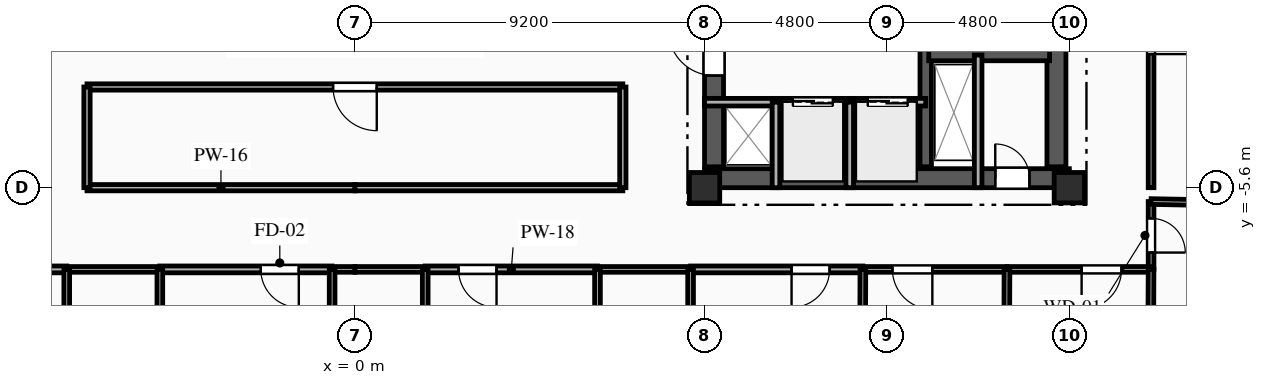
"""IFC4 building model, lengths in metres.
Left out: names, types, materials, properties, quantities, classifications, styles, units other than length and angle.
Written with IfcOpenShell. Run it as: python <this file> out.ifc"""

import sys

from ifc_helpers import new_model, si_unit, direction, frame, frame_2d, origin, origin_2d, place, context, subcontext, project, spatial, rectangle, extrude, element, fill, save


model = new_model("IFC4")
c1 = context("Model", 3, precision=1e-05, world=origin(), true_north=direction((0.0, 1.0)))
c2 = subcontext(c1, "Body", "Model", "MODEL_VIEW")
j1 = project(units=[si_unit("LENGTHUNIT", "METRE"), si_unit("PLANEANGLEUNIT", "RADIAN")], contexts=[c1])
p1 = place(None, origin())
s1 = spatial("IfcSite", under=j1, at=p1, CompositionType="ELEMENT")
p2 = place(p1, origin())
s2 = spatial("IfcBuilding", under=s1, at=p2, CompositionType="ELEMENT")
p3 = place(p2, frame((0.0, 0.0, 206.45)))
s3 = spatial("IfcBuildingStorey", under=s2, at=p3, CompositionType="ELEMENT", Elevation=206.45)
for number, where, z_axis, x_axis in (
    (1, (9.2, -5.6, 0.0), (0.0, 0.0, 1.0), (1.0, 0.0, 0.0)),
    (2, (18.8, -5.6, 0.0), (0.0, 0.0, 1.0), (1.0, 0.0, 0.0)),
):
    element("IfcColumn", number, at=place(p3, frame(where, z_axis=z_axis, x_axis=x_axis)), inside=s3, PredefinedType="COLUMN", context=c2, shape_type="SweptSolid", body=[
        extrude(rectangle(XDim=0.8, YDim=0.8, at=origin_2d()), origin(), (0.0, 0.0, 1.0), 3.35),
    ])
p4 = place(p3, frame((9.2, -5.35, 0.0), z_axis=(0.0, 0.0, 1.0), x_axis=(1.0, 0.0, 0.0)))
e3 = element("IfcWall", 3, at=p4, inside=s3, PredefinedType="SHEAR", context=c2, shape_type="SweptSolid", body=[
    extrude(rectangle(XDim=9.6, YDim=0.5, at=frame_2d((4.8, 0.0))), origin(), (0.0, 0.0, 1.0), 3.04),
])
p5 = place(p4, frame((7.65, 0.0, 0.0)))
e4 = element("IfcOpeningElement", 4, at=p5, cuts=e3, PredefinedType="OPENING", context=c2, shape_type="SweptSolid", body=[
    extrude(rectangle(XDim=0.9, YDim=2.1, at=frame_2d((0.45, 1.05))), frame((0.0, 0.26, 0.0), z_axis=(0.0, -1.0, 0.0), x_axis=(1.0, 0.0, 0.0)), (0.0, 0.0, 1.0), 0.52),
])
p6 = place(p3, frame((9.45, -5.05, 0.0), z_axis=(0.0, 0.0, 1.0), x_axis=(0.0, 1.0, 0.0)))
e5 = element("IfcWall", 5, at=p6, inside=s3, PredefinedType="SHEAR", context=c2, shape_type="SweptSolid", body=[
    extrude(rectangle(XDim=10.1, YDim=0.5, at=frame_2d((5.05, 0.0))), origin(), (0.0, 0.0, 1.0), 3.04),
])
p7 = place(p6, frame((7.15, 0.0, 0.0)))
e6 = element("IfcOpeningElement", 6, at=p7, cuts=e5, PredefinedType="OPENING", context=c2, shape_type="SweptSolid", body=[
    extrude(rectangle(XDim=0.9, YDim=2.1, at=frame_2d((0.45, 1.05))), frame((0.0, 0.26, 0.0), z_axis=(0.0, -1.0, 0.0), x_axis=(1.0, 0.0, 0.0)), (0.0, 0.0, 1.0), 0.52),
])
p8 = place(p6, frame((2.4, 0.0, 0.0)))
e7 = element("IfcOpeningElement", 7, at=p8, cuts=e5, PredefinedType="OPENING", context=c2, shape_type="SweptSolid", body=[
    extrude(rectangle(XDim=1.2, YDim=2.15, at=frame_2d((0.6, 1.075))), frame((0.0, 0.26, 0.0), z_axis=(0.0, -1.0, 0.0), x_axis=(1.0, 0.0, 0.0)), (0.0, 0.0, 1.0), 0.52),
])
p9 = place(p3, frame((18.46, -5.05, 0.0), z_axis=(0.0, 0.0, 1.0), x_axis=(0.0, 1.0, 0.0)))
e8 = element("IfcWall", 8, at=p9, inside=s3, PredefinedType="SHEAR", context=c2, shape_type="SweptSolid", body=[
    extrude(rectangle(XDim=10.1, YDim=0.5, at=frame_2d((5.05, 0.0))), origin(), (0.0, 0.0, 1.0), 3.04),
])
p10 = place(p3, frame((15.02, -5.05, 0.0), z_axis=(0.0, 0.0, 1.0), x_axis=(0.0, 1.0, 0.0)))
e9 = element("IfcWall", 9, at=p10, inside=s3, PredefinedType="SHEAR", context=c2, shape_type="SweptSolid", body=[
    extrude(rectangle(XDim=10.1, YDim=0.3, at=frame_2d((5.05, 0.0))), origin(), (0.0, 0.0, 1.0), 3.04),
])
p11 = place(p3, frame((15.1, -2.11, 0.0), z_axis=(0.0, 0.0, 1.0), x_axis=(1.0, 0.0, 0.0)))
e10 = element("IfcWall", 10, at=p11, inside=s3, PredefinedType="SHEAR", context=c2, shape_type="SweptSolid", body=[
    extrude(rectangle(XDim=3.18, YDim=0.3, at=frame_2d((1.59, 0.0))), origin(), (0.0, 0.0, 1.0), 3.04),
])
p12 = place(p3, frame((16.4, -2.11, 0.0), z_axis=(0.0, 0.0, 1.0), x_axis=(0.0, -1.0, 0.0)))
e11 = element("IfcWall", 11, at=p12, inside=s3, PredefinedType="PARTITIONING", context=c2, shape_type="SweptSolid", body=[
    extrude(rectangle(XDim=3.49, YDim=0.2, at=frame_2d((1.745, 0.0))), origin(), (0.0, 0.0, 1.0), 3.04),
])
p13 = place(p3, frame((9.2, -3.35, 0.0), z_axis=(0.0, 0.0, 1.0), x_axis=(1.0, 0.0, 0.0)))
e12 = element("IfcWall", 12, at=p13, inside=s3, PredefinedType="PARTITIONING", context=c2, shape_type="SweptSolid", body=[
    extrude(rectangle(XDim=1.88, YDim=0.2, at=frame_2d((0.94, 0.0))), origin(), (0.0, 0.0, 1.0), 2.755),
])
p14 = place(p3, frame((11.08, -3.35, 0.0), z_axis=(0.0, 0.0, 1.0), x_axis=(1.0, 0.0, 0.0)))
e13 = element("IfcWall", 13, at=p14, inside=s3, PredefinedType="PARTITIONING", context=c2, shape_type="SweptSolid", body=[
    extrude(rectangle(XDim=1.94, YDim=0.2, at=frame_2d((0.97, 0.0))), origin(), (0.0, 0.0, 1.0), 3.04),
])
p15 = place(p14, frame((0.445, 0.0, 0.0)))
e14 = element("IfcOpeningElement", 14, at=p15, cuts=e13, PredefinedType="OPENING", context=c2, shape_type="SweptSolid", body=[
    extrude(rectangle(XDim=1.05, YDim=2.1, at=frame_2d((0.525, 1.05))), frame((0.0, 0.11, 0.0), z_axis=(0.0, -1.0, 0.0), x_axis=(1.0, 0.0, 0.0)), (0.0, 0.0, 1.0), 0.22),
])
p16 = place(p3, frame((13.02, -3.35, 0.0), z_axis=(0.0, 0.0, 1.0), x_axis=(1.0, 0.0, 0.0)))
e15 = element("IfcWall", 15, at=p16, inside=s3, PredefinedType="PARTITIONING", context=c2, shape_type="SweptSolid", body=[
    extrude(rectangle(XDim=2.0, YDim=0.2, at=frame_2d((1.0, 0.0))), origin(), (0.0, 0.0, 1.0), 3.04),
])
p17 = place(p16, frame((0.475, 0.0, 0.0)))
e16 = element("IfcOpeningElement", 16, at=p17, cuts=e15, PredefinedType="OPENING", context=c2, shape_type="SweptSolid", body=[
    extrude(rectangle(XDim=1.05, YDim=2.1, at=frame_2d((0.525, 1.05))), frame((0.0, 0.11, 0.0), z_axis=(0.0, -1.0, 0.0), x_axis=(1.0, 0.0, 0.0)), (0.0, 0.0, 1.0), 0.22),
])
for number, where, z_axis, x_axis in (
    (17, (11.08, -5.6, 0.0), (0.0, 0.0, 1.0), (0.0, 1.0, 0.0)),
    (18, (13.02, -5.6, 0.0), (0.0, 0.0, 1.0), (0.0, 1.0, 0.0)),
):
    element("IfcWall", number, at=place(p3, frame(where, z_axis=z_axis, x_axis=x_axis)), inside=s3, PredefinedType="PARTITIONING", context=c2, shape_type="SweptSolid", body=[
        extrude(rectangle(XDim=2.25, YDim=0.2, at=frame_2d((1.125, 0.0))), origin(), (0.0, 0.0, 1.0), 3.04),
    ])
p18 = place(p3, frame((-7.583, -7.75, 0.0), z_axis=(0.0, 0.0, 1.0), x_axis=(-1.0, 0.0, 0.0)))
e19 = element("IfcWall", 19, at=p18, inside=s3, PredefinedType="PARTITIONING", context=c2, shape_type="SweptSolid", body=[
    extrude(rectangle(XDim=4.534, YDim=0.18, at=frame_2d((2.267, 0.0))), origin(), (0.0, 0.0, 1.0), 3.04),
])
p19 = place(p18, frame((2.657, 0.0, 0.0)))
e20 = element("IfcOpeningElement", 20, at=p19, cuts=e19, PredefinedType="OPENING", context=c2, shape_type="SweptSolid", body=[
    extrude(rectangle(XDim=1.0, YDim=2.15, at=frame_2d((0.5, 1.075))), frame((0.0, 0.1, 0.0), z_axis=(0.0, -1.0, 0.0), x_axis=(1.0, 0.0, 0.0)), (0.0, 0.0, 1.0), 0.2),
])
p20 = place(p3, frame((-0.6, -7.75, 0.0), z_axis=(0.0, 0.0, 1.0), x_axis=(-1.0, 0.0, 0.0)))
e21 = element("IfcWall", 21, at=p20, inside=s3, PredefinedType="PARTITIONING", context=c2, shape_type="SweptSolid", body=[
    extrude(rectangle(XDim=4.533, YDim=0.18, at=frame_2d((2.267, 0.0))), origin(), (0.0, 0.0, 1.0), 3.04),
])
p21 = place(p20, frame((0.877, 0.0, 0.0)))
e22 = element("IfcOpeningElement", 22, at=p21, cuts=e21, PredefinedType="OPENING", context=c2, shape_type="SweptSolid", body=[
    extrude(rectangle(XDim=1.0, YDim=2.15, at=frame_2d((0.5, 1.075))), frame((0.0, 0.1, 0.0), z_axis=(0.0, -1.0, 0.0), x_axis=(1.0, 0.0, 0.0)), (0.0, 0.0, 1.0), 0.2),
])
p22 = place(p3, frame((-5.133, -7.75, 0.0), z_axis=(0.0, 0.0, 1.0), x_axis=(-1.0, 0.0, 0.0)))
e23 = element("IfcWall", 23, at=p22, inside=s3, PredefinedType="PLUMBINGWALL", context=c2, shape_type="SweptSolid", body=[
    extrude(rectangle(XDim=2.45, YDim=0.15, at=frame_2d((1.225, 0.0))), origin(), (0.0, 0.0, 1.0), 3.04),
])
p23 = place(p3, frame((0.0, -7.75, 0.0), z_axis=(0.0, 0.0, 1.0), x_axis=(-1.0, 0.0, 0.0)))
e24 = element("IfcWall", 24, at=p23, inside=s3, PredefinedType="PLUMBINGWALL", context=c2, shape_type="SweptSolid", body=[
    extrude(rectangle(XDim=0.6, YDim=0.15, at=frame_2d((0.3, 0.0))), origin(), (0.0, 0.0, 1.0), 3.04),
])
p24 = place(p3, frame((-7.05, -5.6, 0.0), z_axis=(0.0, 0.0, 1.0), x_axis=(1.0, 0.0, 0.0)))
e25 = element("IfcWall", 25, at=p24, inside=s3, PredefinedType="PARTITIONING", context=c2, shape_type="SweptSolid", body=[
    extrude(rectangle(XDim=7.05, YDim=0.165, at=frame_2d((3.525, 0.0))), origin(), (0.0, 0.0, 1.0), 2.525),
])
p25 = place(p3, frame((20.95, -5.964, 0.0), z_axis=(0.0, 0.0, 1.0), x_axis=(0.0, -1.0, 0.0)))
e26 = element("IfcWall", 26, at=p25, inside=s3, PredefinedType="PARTITIONING", context=c2, shape_type="SweptSolid", body=[
    extrude(rectangle(XDim=1.786, YDim=0.15, at=frame_2d((0.893, 0.0))), origin(), (0.0, 0.0, 1.0), 3.04),
])
p26 = place(p25, frame((0.443, 0.0, 0.0)))
e27 = element("IfcOpeningElement", 27, at=p26, cuts=e26, PredefinedType="OPENING", context=c2, shape_type="SweptSolid", body=[
    extrude(rectangle(XDim=0.9, YDim=2.1, at=frame_2d((0.45, 1.05))), frame((0.0, 0.085, 0.0), z_axis=(0.0, -1.0, 0.0), x_axis=(1.0, 0.0, 0.0)), (0.0, 0.0, 1.0), 0.17),
])
p27 = place(p3, frame((6.383, -7.75, 0.0), z_axis=(0.0, 0.0, 1.0), x_axis=(-1.0, 0.0, 0.0)))
e28 = element("IfcWall", 28, at=p27, inside=s3, PredefinedType="PARTITIONING", context=c2, shape_type="SweptSolid", body=[
    extrude(rectangle(XDim=4.533, YDim=0.18, at=frame_2d((2.267, 0.0))), origin(), (0.0, 0.0, 1.0), 3.04),
])
p28 = place(p27, frame((2.656, 0.0, 0.0)))
e29 = element("IfcOpeningElement", 29, at=p28, cuts=e28, PredefinedType="OPENING", context=c2, shape_type="SweptSolid", body=[
    extrude(rectangle(XDim=1.0, YDim=2.15, at=frame_2d((0.5, 1.075))), frame((0.0, 0.1, 0.0), z_axis=(0.0, -1.0, 0.0), x_axis=(1.0, 0.0, 0.0)), (0.0, 0.0, 1.0), 0.2),
])
p29 = place(p3, frame((1.85, -7.75, 0.0), z_axis=(0.0, 0.0, 1.0), x_axis=(-1.0, 0.0, 0.0)))
e30 = element("IfcWall", 30, at=p29, inside=s3, PredefinedType="PLUMBINGWALL", context=c2, shape_type="SweptSolid", body=[
    extrude(rectangle(XDim=1.85, YDim=0.15, at=frame_2d((0.925, 0.0))), origin(), (0.0, 0.0, 1.0), 3.04),
])
p30 = place(p3, frame((13.367, -7.75, 0.0), z_axis=(0.0, 0.0, 1.0), x_axis=(-1.0, 0.0, 0.0)))
e31 = element("IfcWall", 31, at=p30, inside=s3, PredefinedType="PARTITIONING", context=c2, shape_type="SweptSolid", body=[
    extrude(rectangle(XDim=4.534, YDim=0.18, at=frame_2d((2.267, 0.0))), origin(), (0.0, 0.0, 1.0), 3.04),
])
p31 = place(p30, frame((0.877, 0.0, 0.0)))
e32 = element("IfcOpeningElement", 32, at=p31, cuts=e31, PredefinedType="OPENING", context=c2, shape_type="SweptSolid", body=[
    extrude(rectangle(XDim=1.0, YDim=2.15, at=frame_2d((0.5, 1.075))), frame((0.0, 0.1, 0.0), z_axis=(0.0, -1.0, 0.0), x_axis=(1.0, 0.0, 0.0)), (0.0, 0.0, 1.0), 0.2),
])
p32 = place(p3, frame((8.833, -7.75, 0.0), z_axis=(0.0, 0.0, 1.0), x_axis=(-1.0, 0.0, 0.0)))
e33 = element("IfcWall", 33, at=p32, inside=s3, PredefinedType="PLUMBINGWALL", context=c2, shape_type="SweptSolid", body=[
    extrude(rectangle(XDim=2.45, YDim=0.15, at=frame_2d((1.225, 0.0))), origin(), (0.0, 0.0, 1.0), 3.04),
])
p33 = place(p3, frame((17.158, -7.75, 0.0), z_axis=(0.0, 0.0, 1.0), x_axis=(-1.0, 0.0, 0.0)))
e34 = element("IfcWall", 34, at=p33, inside=s3, PredefinedType="PARTITIONING", context=c2, shape_type="SweptSolid", body=[
    extrude(rectangle(XDim=3.792, YDim=0.15, at=frame_2d((1.896, 0.0))), origin(), (0.0, 0.0, 1.0), 3.04),
])
p34 = place(p33, frame((1.964, 0.0, 0.0)))
e35 = element("IfcOpeningElement", 35, at=p34, cuts=e34, PredefinedType="OPENING", context=c2, shape_type="SweptSolid", body=[
    extrude(rectangle(XDim=1.05, YDim=2.15, at=frame_2d((0.525, 1.075))), frame((0.0, 0.085, 0.0), z_axis=(0.0, -1.0, 0.0), x_axis=(1.0, 0.0, 0.0)), (0.0, 0.0, 1.0), 0.17),
])
p35 = place(p3, frame((20.95, -7.75, 0.0), z_axis=(0.0, 0.0, 1.0), x_axis=(-1.0, 0.0, 0.0)))
e36 = element("IfcWall", 36, at=p35, inside=s3, PredefinedType="PARTITIONING", context=c2, shape_type="SweptSolid", body=[
    extrude(rectangle(XDim=3.792, YDim=0.15, at=frame_2d((1.896, 0.0))), origin(), (0.0, 0.0, 1.0), 3.04),
])
p36 = place(p35, frame((0.778, 0.0, 0.0)))
e37 = element("IfcOpeningElement", 37, at=p36, cuts=e36, PredefinedType="OPENING", context=c2, shape_type="SweptSolid", body=[
    extrude(rectangle(XDim=1.05, YDim=2.15, at=frame_2d((0.525, 1.075))), frame((0.0, 0.085, 0.0), z_axis=(0.0, -1.0, 0.0), x_axis=(1.0, 0.0, 0.0)), (0.0, 0.0, 1.0), 0.17),
])
p37 = place(p3, frame((0.0, -5.6, 0.0), z_axis=(0.0, 0.0, 1.0), x_axis=(1.0, 0.0, 0.0)))
e38 = element("IfcWall", 38, at=p37, inside=s3, PredefinedType="PARTITIONING", context=c2, shape_type="SweptSolid", body=[
    extrude(rectangle(XDim=7.05, YDim=0.165, at=frame_2d((3.525, 0.0))), origin(), (0.0, 0.0, 1.0), 2.525),
])
p38 = place(p3, frame((20.95, 4.438, 0.0), z_axis=(0.0, 0.0, 1.0), x_axis=(0.0, -1.0, 0.0)))
e39 = element("IfcWall", 39, at=p38, inside=s3, PredefinedType="PARTITIONING", context=c2, shape_type="SweptSolid", body=[
    extrude(rectangle(XDim=10.038, YDim=0.15, at=frame_2d((5.019, 0.0))), origin(), (0.0, 0.0, 1.0), 2.695),
])
p39 = place(p38, frame((5.472, 0.0, 0.0)))
e40 = element("IfcOpeningElement", 40, at=p39, cuts=e39, PredefinedType="OPENING", context=c2, shape_type="SweptSolid", body=[
    extrude(rectangle(XDim=1.05, YDim=2.15, at=frame_2d((0.525, 1.075))), frame((0.0, 0.085, 0.0), z_axis=(0.0, -1.0, 0.0), x_axis=(1.0, 0.0, 0.0)), (0.0, 0.0, 1.0), 0.17),
])
p40 = place(p3, frame((7.05, -2.95, 0.0), z_axis=(0.0, 0.0, 1.0), x_axis=(-1.0, 0.0, 0.0)))
e41 = element("IfcWall", 41, at=p40, inside=s3, PredefinedType="PARTITIONING", context=c2, shape_type="SweptSolid", body=[
    extrude(rectangle(XDim=14.1, YDim=0.165, at=frame_2d((7.05, 0.0))), origin(), (0.0, 0.0, 1.0), 3.04),
])
p41 = place(p40, frame((6.475, 0.0, 0.0)))
e42 = element("IfcOpeningElement", 42, at=p41, cuts=e41, PredefinedType="OPENING", context=c2, shape_type="SweptSolid", body=[
    extrude(rectangle(XDim=1.15, YDim=2.15, at=frame_2d((0.575, 1.075))), frame((0.0, 0.093, 0.0), z_axis=(0.0, -1.0, 0.0), x_axis=(1.0, 0.0, 0.0)), (0.0, 0.0, 1.0), 0.185),
])
for number, where, z_axis, x_axis in (
    (43, (-7.05, -2.95, 0.0), (0.0, 0.0, 1.0), (0.0, -1.0, 0.0)),
    (44, (7.05, -5.6, 0.0), (0.0, 0.0, 1.0), (0.0, 1.0, 0.0)),
):
    element("IfcWall", number, at=place(p3, frame(where, z_axis=z_axis, x_axis=x_axis)), inside=s3, PredefinedType="PARTITIONING", context=c2, shape_type="SweptSolid", body=[
        extrude(rectangle(XDim=2.65, YDim=0.165, at=frame_2d((1.325, 0.0))), origin(), (0.0, 0.0, 1.0), 3.04),
    ])
p42 = place(p3, frame((20.95, -5.964, 0.0), z_axis=(0.0, 0.0, 1.0), x_axis=(0.999809784752, -0.019503700029, 0.0)))
e45 = element("IfcWall", 45, at=p42, inside=s3, PredefinedType="PARTITIONING", context=c2, shape_type="SweptSolid", body=[
    extrude(rectangle(XDim=2.241, YDim=0.15, at=frame_2d((1.12, 0.0))), origin(), (0.0, 0.0, 1.0), 3.04),
])
p43 = place(p3, frame((20.906, -16.708, 0.0), z_axis=(0.0, 0.0, 1.0), x_axis=(0.004905642486, 0.999987967264, 0.0)))
e46 = element("IfcWall", 46, at=p43, inside=s3, PredefinedType="PARTITIONING", context=c2, shape_type="SweptSolid", body=[
    extrude(rectangle(XDim=8.958, YDim=0.15, at=frame_2d((4.479, 0.0))), origin(), (0.0, 0.0, 1.0), 2.665),
])
for number, where, z_axis, x_axis in (
    (47, (-7.583, -7.75, 0.0), (0.0, 0.0, 1.0), (0.0, -1.0, 0.0)),
    (48, (-5.133, -9.9, 0.0), (0.0, 0.0, 1.0), (0.0, 1.0, 0.0)),
    (49, (-0.6, -7.75, 0.0), (0.0, 0.0, 1.0), (0.0, -1.0, 0.0)),
    (50, (1.85, -9.9, 0.0), (0.0, 0.0, 1.0), (0.0, 1.0, 0.0)),
    (51, (6.383, -7.75, 0.0), (0.0, 0.0, 1.0), (0.0, -1.0, 0.0)),
    (52, (8.833, -9.9, 0.0), (0.0, 0.0, 1.0), (0.0, 1.0, 0.0)),
):
    element("IfcWall", number, at=place(p3, frame(where, z_axis=z_axis, x_axis=x_axis)), inside=s3, PredefinedType="PLUMBINGWALL", context=c2, shape_type="SweptSolid", body=[
        extrude(rectangle(XDim=2.15, YDim=0.15, at=frame_2d((1.075, 0.0))), origin(), (0.0, 0.0, 1.0), 3.04),
    ])
p44 = place(p3, frame((13.367, -7.75, 0.0), z_axis=(0.0, 0.0, 1.0), x_axis=(-0.003931559943, -0.999992271388, 0.0)))
e53 = element("IfcWall", 53, at=p44, inside=s3, PredefinedType="PARTITIONING", context=c2, shape_type="SweptSolid", body=[
    extrude(rectangle(XDim=11.177, YDim=0.15, at=frame_2d((5.589, 0.0))), origin(), (0.0, 0.0, 1.0), 3.04),
])
p45 = place(p3, frame((17.158, -7.75, 0.0), z_axis=(0.0, 0.0, 1.0), x_axis=(-0.003796239649, -0.999992794256, 0.0)))
e54 = element("IfcWall", 54, at=p45, inside=s3, PredefinedType="PARTITIONING", context=c2, shape_type="SweptSolid", body=[
    extrude(rectangle(XDim=11.576, YDim=0.15, at=frame_2d((5.788, 0.0))), origin(), (0.0, 0.0, 1.0), 3.04),
])
p46 = place(p5, origin())
e55 = element("IfcDoor", 55, at=p46, inside=s3, OperationType="SINGLE_SWING_LEFT", PredefinedType="DOOR", context=c2, shape_type="SweptSolid", body=[
    extrude(rectangle(XDim=0.9, YDim=2.1, at=frame_2d((0.45, 1.05))), frame((0.0, 0.025, 0.0), z_axis=(0.0, -1.0, 0.0), x_axis=(1.0, 0.0, 0.0)), (0.0, 0.0, 1.0), 0.05),
])
fill(e4, e55)
p47 = place(p15, origin())
e56 = element("IfcDoor", 56, at=p47, inside=s3, OperationType="DOUBLE_DOOR_SLIDING", PredefinedType="DOOR", context=c2, shape_type="SweptSolid", body=[
    extrude(rectangle(XDim=1.05, YDim=2.1, at=frame_2d((0.525, 1.05))), frame((0.0, 0.025, 0.0), z_axis=(0.0, -1.0, 0.0), x_axis=(1.0, 0.0, 0.0)), (0.0, 0.0, 1.0), 0.05),
])
fill(e14, e56)
p48 = place(p17, origin())
e57 = element("IfcDoor", 57, at=p48, inside=s3, OperationType="DOUBLE_DOOR_SLIDING", PredefinedType="DOOR", context=c2, shape_type="SweptSolid", body=[
    extrude(rectangle(XDim=1.05, YDim=2.1, at=frame_2d((0.525, 1.05))), frame((0.0, 0.025, 0.0), z_axis=(0.0, -1.0, 0.0), x_axis=(1.0, 0.0, 0.0)), (0.0, 0.0, 1.0), 0.05),
])
fill(e16, e57)
p49 = place(p8, origin())
e58 = element("IfcDoor", 58, at=p49, inside=s3, OperationType="SINGLE_SWING_RIGHT", PredefinedType="DOOR", context=c2, shape_type="SweptSolid", body=[
    extrude(rectangle(XDim=1.2, YDim=2.15, at=frame_2d((0.6, 1.075))), frame((0.0, 0.025, 0.0), z_axis=(0.0, -1.0, 0.0), x_axis=(1.0, 0.0, 0.0)), (0.0, 0.0, 1.0), 0.05),
])
fill(e7, e58)
p50 = place(p21, origin())
e59 = element("IfcDoor", 59, at=p50, inside=s3, OperationType="SINGLE_SWING_LEFT", PredefinedType="DOOR", context=c2, shape_type="SweptSolid", body=[
    extrude(rectangle(XDim=1.0, YDim=2.15, at=frame_2d((0.5, 1.075))), frame((0.0, 0.025, 0.0), z_axis=(0.0, -1.0, 0.0), x_axis=(1.0, 0.0, 0.0)), (0.0, 0.0, 1.0), 0.05),
])
fill(e22, e59)
p51 = place(p26, origin())
e60 = element("IfcDoor", 60, at=p51, inside=s3, OperationType="SINGLE_SWING_RIGHT", PredefinedType="DOOR", context=c2, shape_type="SweptSolid", body=[
    extrude(rectangle(XDim=0.9, YDim=2.1, at=frame_2d((0.45, 1.05))), frame((0.0, 0.025, 0.0), z_axis=(0.0, -1.0, 0.0), x_axis=(1.0, 0.0, 0.0)), (0.0, 0.0, 1.0), 0.05),
])
fill(e27, e60)
p52 = place(p28, origin())
e61 = element("IfcDoor", 61, at=p52, inside=s3, OperationType="SINGLE_SWING_LEFT", PredefinedType="DOOR", context=c2, shape_type="SweptSolid", body=[
    extrude(rectangle(XDim=1.0, YDim=2.15, at=frame_2d((0.5, 1.075))), frame((0.0, 0.025, 0.0), z_axis=(0.0, -1.0, 0.0), x_axis=(1.0, 0.0, 0.0)), (0.0, 0.0, 1.0), 0.05),
])
fill(e29, e61)
p53 = place(p31, origin())
e62 = element("IfcDoor", 62, at=p53, inside=s3, OperationType="SINGLE_SWING_RIGHT", PredefinedType="DOOR", context=c2, shape_type="SweptSolid", body=[
    extrude(rectangle(XDim=1.0, YDim=2.15, at=frame_2d((0.5, 1.075))), frame((0.0, 0.025, 0.0), z_axis=(0.0, -1.0, 0.0), x_axis=(1.0, 0.0, 0.0)), (0.0, 0.0, 1.0), 0.05),
])
fill(e32, e62)
p54 = place(p34, origin())
e63 = element("IfcDoor", 63, at=p54, inside=s3, OperationType="SINGLE_SWING_LEFT", PredefinedType="DOOR", context=c2, shape_type="SweptSolid", body=[
    extrude(rectangle(XDim=1.05, YDim=2.15, at=frame_2d((0.525, 1.075))), frame((0.0, 0.025, 0.0), z_axis=(0.0, -1.0, 0.0), x_axis=(1.0, 0.0, 0.0)), (0.0, 0.0, 1.0), 0.05),
])
fill(e35, e63)
p55 = place(p36, origin())
e64 = element("IfcDoor", 64, at=p55, inside=s3, OperationType="SINGLE_SWING_RIGHT", PredefinedType="DOOR", context=c2, shape_type="SweptSolid", body=[
    extrude(rectangle(XDim=1.05, YDim=2.15, at=frame_2d((0.525, 1.075))), frame((0.0, 0.025, 0.0), z_axis=(0.0, -1.0, 0.0), x_axis=(1.0, 0.0, 0.0)), (0.0, 0.0, 1.0), 0.05),
])
fill(e37, e64)
p56 = place(p39, origin())
e65 = element("IfcDoor", 65, at=p56, inside=s3, OperationType="SINGLE_SWING_RIGHT", PredefinedType="DOOR", context=c2, shape_type="SweptSolid", body=[
    extrude(rectangle(XDim=1.05, YDim=2.15, at=frame_2d((0.525, 1.075))), frame((0.0, 0.025, 0.0), z_axis=(0.0, -1.0, 0.0), x_axis=(1.0, 0.0, 0.0)), (0.0, 0.0, 1.0), 0.05),
])
fill(e40, e65)
p57 = place(p41, origin())
e66 = element("IfcDoor", 66, at=p57, inside=s3, OperationType="SINGLE_SWING_LEFT", PredefinedType="DOOR", context=c2, shape_type="SweptSolid", body=[
    extrude(rectangle(XDim=1.15, YDim=2.15, at=frame_2d((0.575, 1.075))), frame((0.0, 0.025, 0.0), z_axis=(0.0, -1.0, 0.0), x_axis=(1.0, 0.0, 0.0)), (0.0, 0.0, 1.0), 0.05),
])
fill(e42, e66)
save(model, sys.argv[1])
